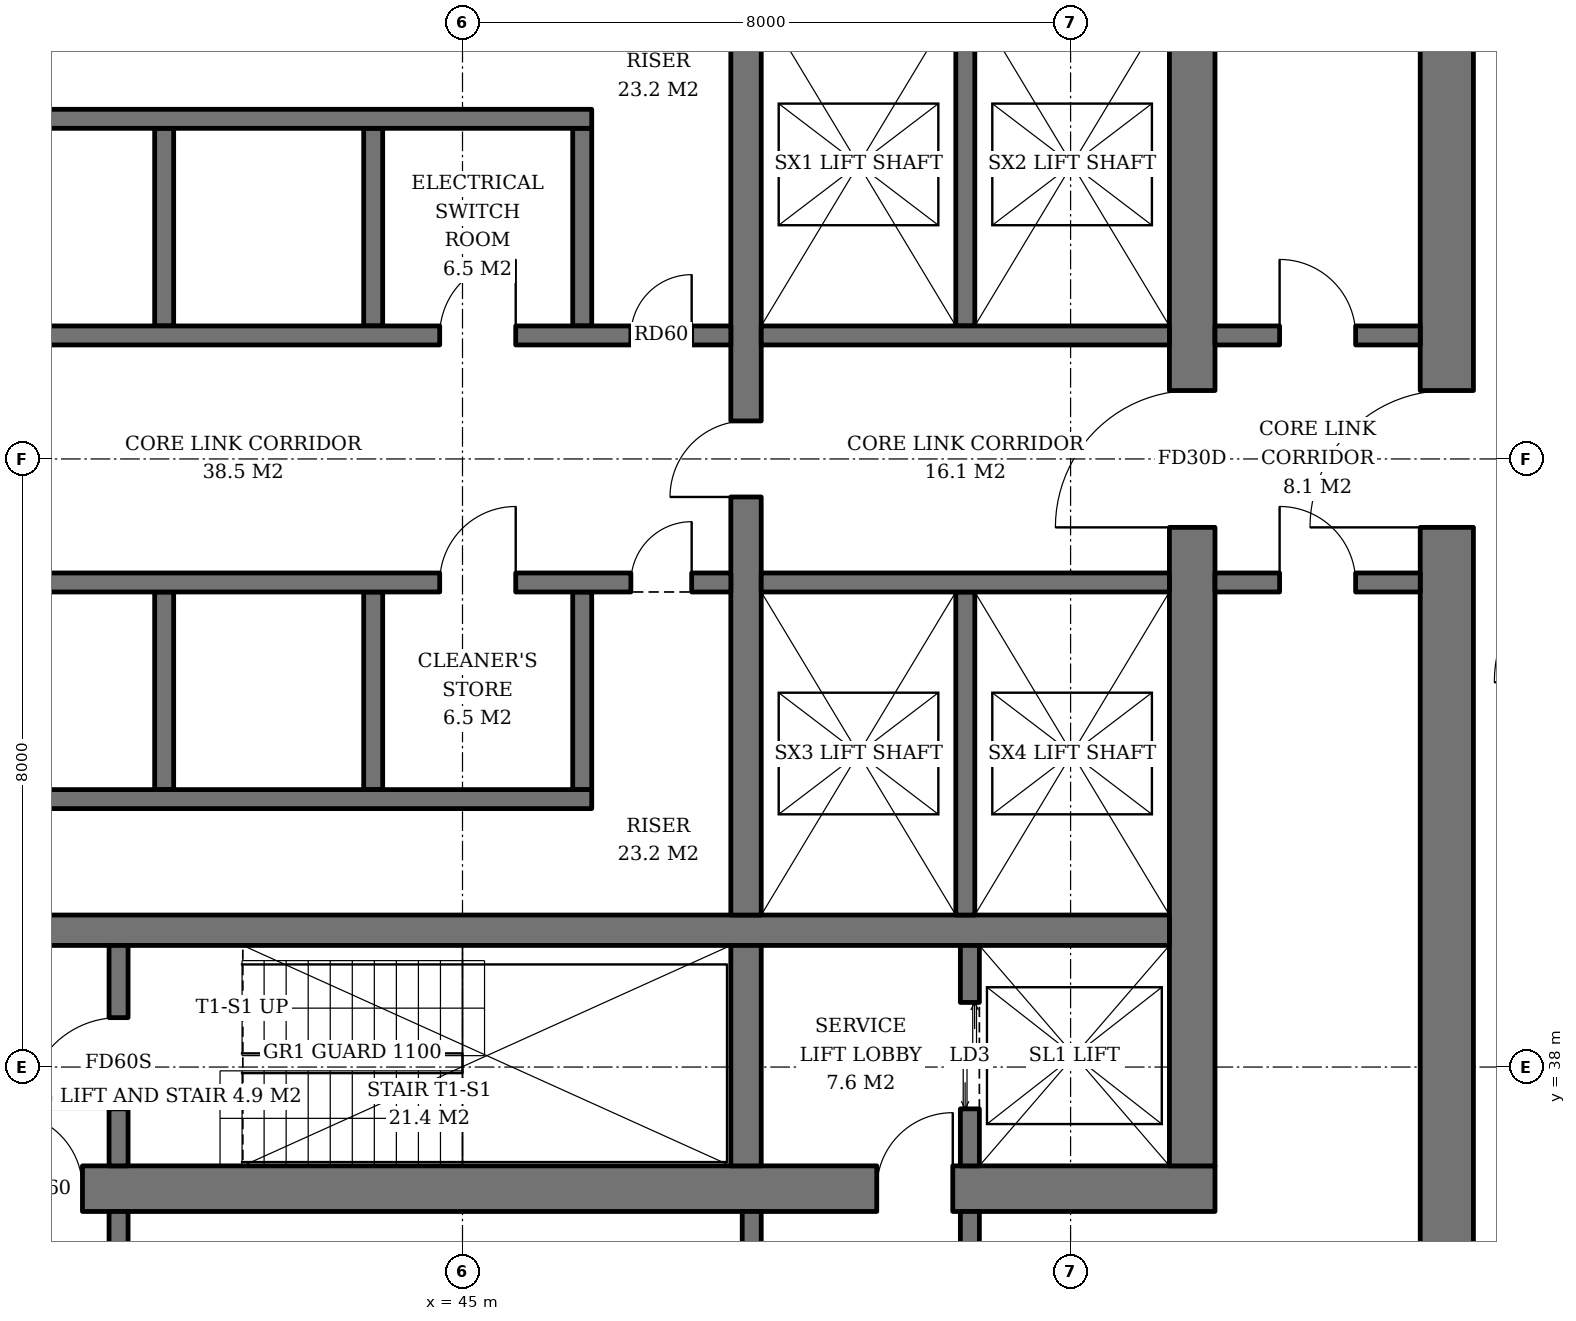
"""IFC4 building model, lengths in metres.
Left out: names, types, materials, properties, quantities, classifications, styles, units other than length and angle.
Written with IfcOpenShell. Run it as: python <this file> out.ifc"""

import sys

from ifc_helpers import new_model, si_unit, direction, frame, frame_2d, origin, place, context, subcontext, project, spatial, rectangle, extrude, element, fill, save


model = new_model("IFC4")
c1 = context("Model", 3, precision=1e-05, world=origin(), true_north=direction((0.0, 1.0)))
c2 = subcontext(c1, "Body", "Model", "MODEL_VIEW")
j1 = project(units=[si_unit("LENGTHUNIT", "METRE"), si_unit("PLANEANGLEUNIT", "RADIAN")], contexts=[c1])
p1 = place(None, origin())
s1 = spatial("IfcSite", under=j1, at=p1, CompositionType="ELEMENT")
p2 = place(p1, origin())
s2 = spatial("IfcBuilding", under=s1, at=p2, CompositionType="ELEMENT")
p3 = place(p2, frame((0.0, 0.0, 161.6)))
s3 = spatial("IfcBuildingStorey", under=s2, at=p3, CompositionType="ELEMENT", Elevation=161.6)
p4 = place(p3, frame((35.1, 36.4, 0.0), z_axis=(0.0, 0.0, 1.0), x_axis=(1.0, 0.0, 0.0)))
e1 = element("IfcWall", 1, at=p4, inside=s3, PredefinedType="SHEAR", context=c2, shape_type="SweptSolid", body=[
    extrude(rectangle(XDim=19.8, YDim=0.6, at=frame_2d((9.9, 0.0))), origin(), (0.0, 0.0, 1.0), 3.8),
])
p5 = place(p4, frame((3.9, 0.0, 0.0)))
e2 = element("IfcOpeningElement", 2, at=p5, cuts=e1, PredefinedType="OPENING", context=c2, shape_type="SweptSolid", body=[
    extrude(rectangle(XDim=1.0, YDim=2.1, at=frame_2d((0.5, 1.05))), frame((0.0, 0.31, 0.0), z_axis=(0.0, -1.0, 0.0), x_axis=(1.0, 0.0, 0.0)), (0.0, 0.0, 1.0), 0.62),
])
p6 = place(p4, frame((15.35, 0.0, 0.0)))
e3 = element("IfcOpeningElement", 3, at=p6, cuts=e1, PredefinedType="OPENING", context=c2, shape_type="SweptSolid", body=[
    extrude(rectangle(XDim=1.0, YDim=2.1, at=frame_2d((0.5, 1.05))), frame((0.0, 0.31, 0.0), z_axis=(0.0, -1.0, 0.0), x_axis=(1.0, 0.0, 0.0)), (0.0, 0.0, 1.0), 0.62),
])
p7 = place(p3, frame((54.6, 36.7, 0.0), z_axis=(0.0, 0.0, 1.0), x_axis=(0.0, 1.0, 0.0)))
e4 = element("IfcWall", 4, at=p7, inside=s3, PredefinedType="SHEAR", context=c2, shape_type="SweptSolid", body=[
    extrude(rectangle(XDim=18.6, YDim=0.6, at=frame_2d((9.3, 0.0))), origin(), (0.0, 0.0, 1.0), 3.8),
])
p8 = place(p7, frame((8.4, 0.0, 0.0)))
e5 = element("IfcOpeningElement", 5, at=p8, cuts=e4, PredefinedType="OPENING", context=c2, shape_type="SweptSolid", body=[
    extrude(rectangle(XDim=1.8, YDim=2.4, at=frame_2d((0.9, 1.2))), frame((0.0, 0.31, 0.0), z_axis=(0.0, -1.0, 0.0), x_axis=(1.0, 0.0, 0.0)), (0.0, 0.0, 1.0), 0.62),
])
p9 = place(p3, frame((57.95, 33.4, 0.0), z_axis=(0.0, 0.0, 1.0), x_axis=(0.0, 1.0, 0.0)))
e6 = element("IfcWall", 6, at=p9, inside=s3, PredefinedType="SHEAR", context=c2, shape_type="SweptSolid", body=[
    extrude(rectangle(XDim=25.2, YDim=0.7, at=frame_2d((12.6, 0.0))), origin(), (0.0, 0.0, 1.0), 3.8),
])
p10 = place(p9, frame((11.7, 0.0, 0.0)))
e7 = element("IfcOpeningElement", 7, at=p10, cuts=e6, PredefinedType="OPENING", context=c2, shape_type="SweptSolid", body=[
    extrude(rectangle(XDim=1.8, YDim=2.4, at=frame_2d((0.9, 1.2))), frame((0.0, 0.36, 0.0), z_axis=(0.0, -1.0, 0.0), x_axis=(1.0, 0.0, 0.0)), (0.0, 0.0, 1.0), 0.72),
])
p11 = place(p3, frame((35.7, 39.8, 0.0), z_axis=(0.0, 0.0, 1.0), x_axis=(1.0, 0.0, 0.0)))
e8 = element("IfcWall", 8, at=p11, inside=s3, PredefinedType="SHEAR", context=c2, shape_type="SweptSolid", body=[
    extrude(rectangle(XDim=18.6, YDim=0.4, at=frame_2d((9.3, 0.0))), origin(), (0.0, 0.0, 1.0), 3.8),
])
p12 = place(p3, frame((48.73, 36.7, 0.0), z_axis=(0.0, 0.0, 1.0), x_axis=(0.0, 1.0, 0.0)))
e9 = element("IfcWall", 9, at=p12, inside=s3, PredefinedType="SHEAR", context=c2, shape_type="SweptSolid", body=[
    extrude(rectangle(XDim=2.9, YDim=0.4, at=frame_2d((1.45, 0.0))), origin(), (0.0, 0.0, 1.0), 3.8),
])
p13 = place(p3, frame((48.73, 40.0, 0.0), z_axis=(0.0, 0.0, 1.0), x_axis=(0.0, 1.0, 0.0)))
e10 = element("IfcWall", 10, at=p13, inside=s3, PredefinedType="SHEAR", context=c2, shape_type="SweptSolid", body=[
    extrude(rectangle(XDim=12.0, YDim=0.4, at=frame_2d((6.0, 0.0))), origin(), (0.0, 0.0, 1.0), 3.8),
])
p14 = place(p13, frame((5.5, 0.0, 0.0)))
e11 = element("IfcOpeningElement", 11, at=p14, cuts=e10, PredefinedType="OPENING", context=c2, shape_type="SweptSolid", body=[
    extrude(rectangle(XDim=1.0, YDim=2.1, at=frame_2d((0.5, 1.05))), frame((0.0, 0.21, 0.0), z_axis=(0.0, -1.0, 0.0), x_axis=(1.0, 0.0, 0.0)), (0.0, 0.0, 1.0), 0.42),
])
p15 = place(p3, frame((40.475, 36.7, 0.0), z_axis=(0.0, 0.0, 1.0), x_axis=(0.0, 1.0, 0.0)))
e12 = element("IfcWall", 12, at=p15, inside=s3, PredefinedType="SHEAR", context=c2, shape_type="SweptSolid", body=[
    extrude(rectangle(XDim=2.9, YDim=0.25, at=frame_2d((1.45, 0.0))), origin(), (0.0, 0.0, 1.0), 3.8),
])
p16 = place(p15, frame((0.75, 0.0, 0.0)))
e13 = element("IfcOpeningElement", 13, at=p16, cuts=e12, PredefinedType="OPENING", context=c2, shape_type="SweptSolid", body=[
    extrude(rectangle(XDim=1.2, YDim=2.1, at=frame_2d((0.6, 1.05))), frame((0.0, 0.135, 0.0), z_axis=(0.0, -1.0, 0.0), x_axis=(1.0, 0.0, 0.0)), (0.0, 0.0, 1.0), 0.27),
])
p17 = place(p3, frame((51.675, 36.7, 0.0), z_axis=(0.0, 0.0, 1.0), x_axis=(0.0, 1.0, 0.0)))
e14 = element("IfcWall", 14, at=p17, inside=s3, PredefinedType="SHEAR", context=c2, shape_type="SweptSolid", body=[
    extrude(rectangle(XDim=2.9, YDim=0.25, at=frame_2d((1.45, 0.0))), origin(), (0.0, 0.0, 1.0), 3.8),
])
p18 = place(p17, frame((0.75, 0.0, 0.0)))
e15 = element("IfcOpeningElement", 15, at=p18, cuts=e14, PredefinedType="OPENING", context=c2, shape_type="SweptSolid", body=[
    extrude(rectangle(XDim=1.4, YDim=2.4, at=frame_2d((0.7, 1.2))), frame((0.0, 0.135, 0.0), z_axis=(0.0, -1.0, 0.0), x_axis=(1.0, 0.0, 0.0)), (0.0, 0.0, 1.0), 0.27),
])
for number, where, z_axis, x_axis in (
    (16, (41.075, 47.75, 0.0), (0.0, 0.0, 1.0), (0.0, 1.0, 0.0)),
    (17, (43.825, 47.75, 0.0), (0.0, 0.0, 1.0), (0.0, 1.0, 0.0)),
    (18, (46.575, 47.75, 0.0), (0.0, 0.0, 1.0), (0.0, 1.0, 0.0)),
):
    element("IfcWall", number, at=place(p3, frame(where, z_axis=z_axis, x_axis=x_axis)), inside=s3, PredefinedType="SHEAR", context=c2, shape_type="SweptSolid", body=[
        extrude(rectangle(XDim=2.6, YDim=0.25, at=frame_2d((1.3, 0.0))), origin(), (0.0, 0.0, 1.0), 3.8),
    ])
p19 = place(p3, frame((35.7, 50.475, 0.0), z_axis=(0.0, 0.0, 1.0), x_axis=(1.0, 0.0, 0.0)))
e19 = element("IfcWall", 19, at=p19, inside=s3, PredefinedType="SHEAR", context=c2, shape_type="SweptSolid", body=[
    extrude(rectangle(XDim=11.0, YDim=0.25, at=frame_2d((5.5, 0.0))), origin(), (0.0, 0.0, 1.0), 3.8),
])
p20 = place(p3, frame((35.7, 47.625, 0.0), z_axis=(0.0, 0.0, 1.0), x_axis=(1.0, 0.0, 0.0)))
e20 = element("IfcWall", 20, at=p20, inside=s3, PredefinedType="SHEAR", context=c2, shape_type="SweptSolid", body=[
    extrude(rectangle(XDim=12.83, YDim=0.25, at=frame_2d((6.415, 0.0))), origin(), (0.0, 0.0, 1.0), 3.8),
])
p21 = place(p20, frame((9.0, 0.0, 0.0)))
e21 = element("IfcOpeningElement", 21, at=p21, cuts=e20, PredefinedType="OPENING", context=c2, shape_type="SweptSolid", body=[
    extrude(rectangle(XDim=1.0, YDim=2.1, at=frame_2d((0.5, 1.05))), frame((0.0, 0.135, 0.0), z_axis=(0.0, -1.0, 0.0), x_axis=(1.0, 0.0, 0.0)), (0.0, 0.0, 1.0), 0.27),
])
p22 = place(p20, frame((11.515, 0.0, 0.0)))
e22 = element("IfcOpeningElement", 22, at=p22, cuts=e20, PredefinedType="OPENING", context=c2, shape_type="SweptSolid", body=[
    extrude(rectangle(XDim=0.8, YDim=2.0, at=frame_2d((0.4, 1.0))), frame((0.0, 0.135, 0.0), z_axis=(0.0, -1.0, 0.0), x_axis=(1.0, 0.0, 0.0)), (0.0, 0.0, 1.0), 0.27),
])
for number, where, z_axis, x_axis in (
    (23, (41.075, 44.25, 0.0), (0.0, 0.0, 1.0), (0.0, -1.0, 0.0)),
    (24, (43.825, 44.25, 0.0), (0.0, 0.0, 1.0), (0.0, -1.0, 0.0)),
    (25, (46.575, 44.25, 0.0), (0.0, 0.0, 1.0), (0.0, -1.0, 0.0)),
):
    element("IfcWall", number, at=place(p3, frame(where, z_axis=z_axis, x_axis=x_axis)), inside=s3, PredefinedType="SHEAR", context=c2, shape_type="SweptSolid", body=[
        extrude(rectangle(XDim=2.6, YDim=0.25, at=frame_2d((1.3, 0.0))), origin(), (0.0, 0.0, 1.0), 3.8),
    ])
p23 = place(p3, frame((35.7, 41.525, 0.0), z_axis=(0.0, 0.0, 1.0), x_axis=(1.0, 0.0, 0.0)))
e26 = element("IfcWall", 26, at=p23, inside=s3, PredefinedType="SHEAR", context=c2, shape_type="SweptSolid", body=[
    extrude(rectangle(XDim=11.0, YDim=0.25, at=frame_2d((5.5, 0.0))), origin(), (0.0, 0.0, 1.0), 3.8),
])
p24 = place(p3, frame((35.7, 44.375, 0.0), z_axis=(0.0, 0.0, 1.0), x_axis=(1.0, 0.0, 0.0)))
e27 = element("IfcWall", 27, at=p24, inside=s3, PredefinedType="SHEAR", context=c2, shape_type="SweptSolid", body=[
    extrude(rectangle(XDim=12.83, YDim=0.25, at=frame_2d((6.415, 0.0))), origin(), (0.0, 0.0, 1.0), 3.8),
])
p25 = place(p24, frame((9.0, 0.0, 0.0)))
e28 = element("IfcOpeningElement", 28, at=p25, cuts=e27, PredefinedType="OPENING", context=c2, shape_type="SweptSolid", body=[
    extrude(rectangle(XDim=1.0, YDim=2.1, at=frame_2d((0.5, 1.05))), frame((0.0, 0.135, 0.0), z_axis=(0.0, -1.0, 0.0), x_axis=(1.0, 0.0, 0.0)), (0.0, 0.0, 1.0), 0.27),
])
p26 = place(p24, frame((11.515, 0.0, 0.0)))
e29 = element("IfcOpeningElement", 29, at=p26, cuts=e27, PredefinedType="OPENING", context=c2, shape_type="SweptSolid", body=[
    extrude(rectangle(XDim=0.8, YDim=2.0, at=frame_2d((0.4, 1.0))), frame((0.0, 0.135, 0.0), z_axis=(0.0, -1.0, 0.0), x_axis=(1.0, 0.0, 0.0)), (0.0, 0.0, 1.0), 0.27),
])
p27 = place(p3, frame((51.615, 47.75, 0.0), z_axis=(0.0, 0.0, 1.0), x_axis=(0.0, 1.0, 0.0)))
e30 = element("IfcWall", 30, at=p27, inside=s3, PredefinedType="SHEAR", context=c2, shape_type="SweptSolid", body=[
    extrude(rectangle(XDim=4.25, YDim=0.25, at=frame_2d((2.125, 0.0))), origin(), (0.0, 0.0, 1.0), 3.8),
])
p28 = place(p3, frame((48.93, 47.625, 0.0), z_axis=(0.0, 0.0, 1.0), x_axis=(1.0, 0.0, 0.0)))
e31 = element("IfcWall", 31, at=p28, inside=s3, PredefinedType="SHEAR", context=c2, shape_type="SweptSolid", body=[
    extrude(rectangle(XDim=5.37, YDim=0.25, at=frame_2d((2.685, 0.0))), origin(), (0.0, 0.0, 1.0), 3.8),
])
p29 = place(p3, frame((51.615, 44.25, 0.0), z_axis=(0.0, 0.0, 1.0), x_axis=(0.0, -1.0, 0.0)))
e32 = element("IfcWall", 32, at=p29, inside=s3, PredefinedType="SHEAR", context=c2, shape_type="SweptSolid", body=[
    extrude(rectangle(XDim=4.25, YDim=0.25, at=frame_2d((2.125, 0.0))), origin(), (0.0, 0.0, 1.0), 3.8),
])
p30 = place(p3, frame((48.93, 44.375, 0.0), z_axis=(0.0, 0.0, 1.0), x_axis=(1.0, 0.0, 0.0)))
e33 = element("IfcWall", 33, at=p30, inside=s3, PredefinedType="SHEAR", context=c2, shape_type="SweptSolid", body=[
    extrude(rectangle(XDim=5.37, YDim=0.25, at=frame_2d((2.685, 0.0))), origin(), (0.0, 0.0, 1.0), 3.8),
])
p31 = place(p3, frame((40.475, 33.4, 0.0), z_axis=(0.0, 0.0, 1.0), x_axis=(0.0, 1.0, 0.0)))
e34 = element("IfcWall", 34, at=p31, inside=s3, PredefinedType="SOLIDWALL", context=c2, shape_type="SweptSolid", body=[
    extrude(rectangle(XDim=2.7, YDim=0.25, at=frame_2d((1.35, 0.0))), origin(), (0.0, 0.0, 1.0), 3.2),
])
p32 = place(p31, frame((0.85, 0.0, 0.0)))
e35 = element("IfcOpeningElement", 35, at=p32, cuts=e34, PredefinedType="OPENING", context=c2, shape_type="SweptSolid", body=[
    extrude(rectangle(XDim=1.0, YDim=2.1, at=frame_2d((0.5, 1.05))), frame((0.0, 0.135, 0.0), z_axis=(0.0, -1.0, 0.0), x_axis=(1.0, 0.0, 0.0)), (0.0, 0.0, 1.0), 0.27),
])
p33 = place(p3, frame((54.9, 44.375, 0.0), z_axis=(0.0, 0.0, 1.0), x_axis=(1.0, 0.0, 0.0)))
e36 = element("IfcWall", 36, at=p33, inside=s3, PredefinedType="SOLIDWALL", context=c2, shape_type="SweptSolid", body=[
    extrude(rectangle(XDim=2.7, YDim=0.25, at=frame_2d((1.35, 0.0))), origin(), (0.0, 0.0, 1.0), 3.2),
])
p34 = place(p33, frame((0.85, 0.0, 0.0)))
e37 = element("IfcOpeningElement", 37, at=p34, cuts=e36, PredefinedType="OPENING", context=c2, shape_type="SweptSolid", body=[
    extrude(rectangle(XDim=1.0, YDim=2.1, at=frame_2d((0.5, 1.05))), frame((0.0, 0.135, 0.0), z_axis=(0.0, -1.0, 0.0), x_axis=(1.0, 0.0, 0.0)), (0.0, 0.0, 1.0), 0.27),
])
p35 = place(p3, frame((54.9, 47.625, 0.0), z_axis=(0.0, 0.0, 1.0), x_axis=(1.0, 0.0, 0.0)))
e38 = element("IfcWall", 38, at=p35, inside=s3, PredefinedType="SOLIDWALL", context=c2, shape_type="SweptSolid", body=[
    extrude(rectangle(XDim=2.7, YDim=0.25, at=frame_2d((1.35, 0.0))), origin(), (0.0, 0.0, 1.0), 3.2),
])
p36 = place(p35, frame((0.85, 0.0, 0.0)))
e39 = element("IfcOpeningElement", 39, at=p36, cuts=e38, PredefinedType="OPENING", context=c2, shape_type="SweptSolid", body=[
    extrude(rectangle(XDim=1.0, YDim=2.1, at=frame_2d((0.5, 1.05))), frame((0.0, 0.135, 0.0), z_axis=(0.0, -1.0, 0.0), x_axis=(1.0, 0.0, 0.0)), (0.0, 0.0, 1.0), 0.27),
])
p37 = place(p3, frame((48.805, 33.4, 0.0), z_axis=(0.0, 0.0, 1.0), x_axis=(0.0, 1.0, 0.0)))
e40 = element("IfcWall", 40, at=p37, inside=s3, PredefinedType="SOLIDWALL", context=c2, shape_type="SweptSolid", body=[
    extrude(rectangle(XDim=2.7, YDim=0.25, at=frame_2d((1.35, 0.0))), origin(), (0.0, 0.0, 1.0), 3.2),
])
p38 = place(p37, frame((0.85, 0.0, 0.0)))
e41 = element("IfcOpeningElement", 41, at=p38, cuts=e40, PredefinedType="OPENING", context=c2, shape_type="SweptSolid", body=[
    extrude(rectangle(XDim=1.0, YDim=2.1, at=frame_2d((0.5, 1.05))), frame((0.0, 0.135, 0.0), z_axis=(0.0, -1.0, 0.0), x_axis=(1.0, 0.0, 0.0)), (0.0, 0.0, 1.0), 0.27),
])
p39 = place(p3, frame((51.675, 33.4, 0.0), z_axis=(0.0, 0.0, 1.0), x_axis=(0.0, 1.0, 0.0)))
e42 = element("IfcWall", 42, at=p39, inside=s3, PredefinedType="SOLIDWALL", context=c2, shape_type="SweptSolid", body=[
    extrude(rectangle(XDim=2.7, YDim=0.25, at=frame_2d((1.35, 0.0))), origin(), (0.0, 0.0, 1.0), 3.2),
])
p40 = place(p39, frame((0.85, 0.0, 0.0)))
e43 = element("IfcOpeningElement", 43, at=p40, cuts=e42, PredefinedType="OPENING", context=c2, shape_type="SweptSolid", body=[
    extrude(rectangle(XDim=1.0, YDim=2.1, at=frame_2d((0.5, 1.05))), frame((0.0, 0.135, 0.0), z_axis=(0.0, -1.0, 0.0), x_axis=(1.0, 0.0, 0.0)), (0.0, 0.0, 1.0), 0.27),
])
p41 = place(p16, origin())
e44 = element("IfcDoor", 44, at=p41, inside=s3, OperationType="SINGLE_SWING_LEFT", PredefinedType="DOOR", context=c2, shape_type="SweptSolid", body=[
    extrude(rectangle(XDim=1.2, YDim=2.1, at=frame_2d((0.6, 1.05))), frame((0.0, 0.025, 0.0), z_axis=(0.0, -1.0, 0.0), x_axis=(1.0, 0.0, 0.0)), (0.0, 0.0, 1.0), 0.05),
])
fill(e13, e44)
p42 = place(p18, origin())
e45 = element("IfcDoor", 45, at=p42, inside=s3, OperationType="DOUBLE_DOOR_SLIDING", PredefinedType="DOOR", context=c2, shape_type="SweptSolid", body=[
    extrude(rectangle(XDim=1.4, YDim=2.4, at=frame_2d((0.7, 1.2))), frame((0.0, 0.025, 0.0), z_axis=(0.0, -1.0, 0.0), x_axis=(1.0, 0.0, 0.0)), (0.0, 0.0, 1.0), 0.05),
])
fill(e15, e45)
p43 = place(p21, origin())
e46 = element("IfcDoor", 46, at=p43, inside=s3, OperationType="SINGLE_SWING_RIGHT", PredefinedType="DOOR", context=c2, shape_type="SweptSolid", body=[
    extrude(rectangle(XDim=1.0, YDim=2.1, at=frame_2d((0.5, 1.05))), frame((0.0, 0.025, 0.0), z_axis=(0.0, -1.0, 0.0), x_axis=(1.0, 0.0, 0.0)), (0.0, 0.0, 1.0), 0.05),
])
fill(e21, e46)
p44 = place(p22, origin())
e47 = element("IfcDoor", 47, at=p44, inside=s3, OperationType="SINGLE_SWING_RIGHT", PredefinedType="DOOR", context=c2, shape_type="SweptSolid", body=[
    extrude(rectangle(XDim=0.8, YDim=2.0, at=frame_2d((0.4, 1.0))), frame((0.0, 0.025, 0.0), z_axis=(0.0, -1.0, 0.0), x_axis=(1.0, 0.0, 0.0)), (0.0, 0.0, 1.0), 0.05),
])
fill(e22, e47)
p45 = place(p25, origin())
e48 = element("IfcDoor", 48, at=p45, inside=s3, OperationType="SINGLE_SWING_RIGHT", PredefinedType="DOOR", context=c2, shape_type="SweptSolid", body=[
    extrude(rectangle(XDim=1.0, YDim=2.1, at=frame_2d((0.5, 1.05))), frame((0.0, 0.025, 0.0), z_axis=(0.0, -1.0, 0.0), x_axis=(1.0, 0.0, 0.0)), (0.0, 0.0, 1.0), 0.05),
])
fill(e28, e48)
p46 = place(p26, origin())
e49 = element("IfcDoor", 49, at=p46, inside=s3, OperationType="SINGLE_SWING_RIGHT", PredefinedType="DOOR", context=c2, shape_type="SweptSolid", body=[
    extrude(rectangle(XDim=0.8, YDim=2.0, at=frame_2d((0.4, 1.0))), frame((0.0, 0.025, 0.0), z_axis=(0.0, -1.0, 0.0), x_axis=(1.0, 0.0, 0.0)), (0.0, 0.0, 1.0), 0.05),
])
fill(e29, e49)
p47 = place(p34, origin())
e50 = element("IfcDoor", 50, at=p47, inside=s3, OperationType="SINGLE_SWING_LEFT", PredefinedType="DOOR", context=c2, shape_type="SweptSolid", body=[
    extrude(rectangle(XDim=1.0, YDim=2.1, at=frame_2d((0.5, 1.05))), frame((0.0, 0.025, 0.0), z_axis=(0.0, -1.0, 0.0), x_axis=(1.0, 0.0, 0.0)), (0.0, 0.0, 1.0), 0.05),
])
fill(e37, e50)
p48 = place(p36, origin())
e51 = element("IfcDoor", 51, at=p48, inside=s3, OperationType="SINGLE_SWING_LEFT", PredefinedType="DOOR", context=c2, shape_type="SweptSolid", body=[
    extrude(rectangle(XDim=1.0, YDim=2.1, at=frame_2d((0.5, 1.05))), frame((0.0, 0.025, 0.0), z_axis=(0.0, -1.0, 0.0), x_axis=(1.0, 0.0, 0.0)), (0.0, 0.0, 1.0), 0.05),
])
fill(e39, e51)
p49 = place(p14, origin())
e52 = element("IfcDoor", 52, at=p49, inside=s3, OperationType="SINGLE_SWING_LEFT", PredefinedType="DOOR", context=c2, shape_type="SweptSolid", body=[
    extrude(rectangle(XDim=1.0, YDim=2.1, at=frame_2d((0.5, 1.05))), frame((0.0, 0.025, 0.0), z_axis=(0.0, -1.0, 0.0), x_axis=(1.0, 0.0, 0.0)), (0.0, 0.0, 1.0), 0.05),
])
fill(e11, e52)
p50 = place(p5, origin())
e53 = element("IfcDoor", 53, at=p50, inside=s3, OperationType="SINGLE_SWING_LEFT", PredefinedType="DOOR", context=c2, shape_type="SweptSolid", body=[
    extrude(rectangle(XDim=1.0, YDim=2.1, at=frame_2d((0.5, 1.05))), frame((0.0, 0.025, 0.0), z_axis=(0.0, -1.0, 0.0), x_axis=(1.0, 0.0, 0.0)), (0.0, 0.0, 1.0), 0.05),
])
fill(e2, e53)
p51 = place(p8, origin())
e54 = element("IfcDoor", 54, at=p51, inside=s3, OperationType="DOUBLE_DOOR_SINGLE_SWING", PredefinedType="DOOR", context=c2, shape_type="SweptSolid", body=[
    extrude(rectangle(XDim=1.8, YDim=2.4, at=frame_2d((0.9, 1.2))), frame((0.0, 0.025, 0.0), z_axis=(0.0, -1.0, 0.0), x_axis=(1.0, 0.0, 0.0)), (0.0, 0.0, 1.0), 0.05),
])
fill(e5, e54)
p52 = place(p6, origin())
e55 = element("IfcDoor", 55, at=p52, inside=s3, OperationType="SINGLE_SWING_RIGHT", PredefinedType="DOOR", context=c2, shape_type="SweptSolid", body=[
    extrude(rectangle(XDim=1.0, YDim=2.1, at=frame_2d((0.5, 1.05))), frame((0.0, 0.025, 0.0), z_axis=(0.0, -1.0, 0.0), x_axis=(1.0, 0.0, 0.0)), (0.0, 0.0, 1.0), 0.05),
])
fill(e3, e55)
p53 = place(p10, origin())
e56 = element("IfcDoor", 56, at=p53, inside=s3, OperationType="DOUBLE_DOOR_SINGLE_SWING", PredefinedType="DOOR", context=c2, shape_type="SweptSolid", body=[
    extrude(rectangle(XDim=1.8, YDim=2.4, at=frame_2d((0.9, 1.2))), frame((0.0, 0.025, 0.0), z_axis=(0.0, -1.0, 0.0), x_axis=(1.0, 0.0, 0.0)), (0.0, 0.0, 1.0), 0.05),
])
fill(e7, e56)
save(model, sys.argv[1])
